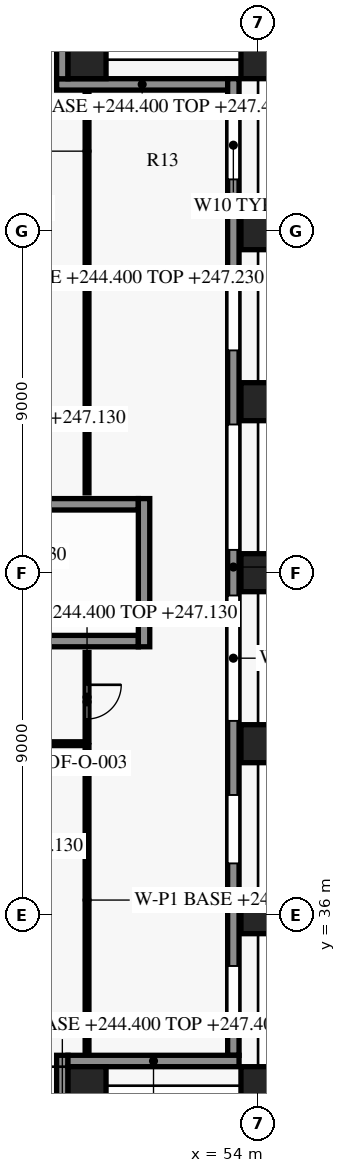
"""IFC4 building model, lengths in metres.
Left out: names, types, materials, properties, quantities, classifications, styles, units other than length and angle.
Written with IfcOpenShell. Run it as: python <this file> out.ifc"""

import sys

from ifc_helpers import new_model, si_unit, direction, frame, frame_2d, origin, origin_2d, place, context, subcontext, project, spatial, rectangle, extrude, element, fill, save


model = new_model("IFC4")
c1 = context("Model", 3, precision=1e-05, world=origin(), true_north=direction((0.0, 1.0)))
c2 = subcontext(c1, "Body", "Model", "MODEL_VIEW")
j1 = project(units=[si_unit("LENGTHUNIT", "METRE"), si_unit("PLANEANGLEUNIT", "RADIAN")], contexts=[c1])
p1 = place(None, origin())
s1 = spatial("IfcSite", under=j1, at=p1, CompositionType="ELEMENT")
p2 = place(p1, origin())
s2 = spatial("IfcBuilding", under=s1, at=p2, CompositionType="ELEMENT")
p3 = place(p2, frame((0.0, 0.0, 244.4)))
s3 = spatial("IfcBuildingStorey", under=s2, at=p3, CompositionType="ELEMENT", Elevation=244.4)
for number, where, z_axis, x_axis in (
    (1, (54.0, 31.5, 0.0), (0.0, 0.0, 1.0), (0.0, 1.0, 0.0)),
    (2, (54.0, 36.0, 0.0), (0.0, 0.0, 1.0), (0.0, 1.0, 0.0)),
    (3, (54.0, 40.5, 0.0), (0.0, 0.0, 1.0), (0.0, 1.0, 0.0)),
    (4, (54.0, 45.0, 0.0), (0.0, 0.0, 1.0), (0.0, 1.0, 0.0)),
    (5, (54.0, 49.5, 0.0), (0.0, 0.0, 1.0), (0.0, 1.0, 0.0)),
    (6, (54.0, 54.0, 0.0), (0.0, 0.0, 1.0), (0.0, 1.0, 0.0)),
    (7, (54.0, 58.5, 0.0), (0.0, 0.0, 1.0), (0.0, 1.0, 0.0)),
):
    element("IfcColumn", number, at=place(p3, frame(where, z_axis=z_axis, x_axis=x_axis)), inside=s3, PredefinedType="COLUMN", context=c2, shape_type="SweptSolid", body=[
        extrude(rectangle(XDim=0.9, YDim=1.0, at=origin_2d()), origin(), (0.0, 0.0, 1.0), 3.8),
    ])
for number, where, z_axis, x_axis in (
    (8, (49.5, 31.5, 0.0), (0.0, 0.0, 1.0), (1.0, 0.0, 0.0)),
    (9, (49.5, 58.5, 0.0), (0.0, 0.0, 1.0), (1.0, 0.0, 0.0)),
):
    element("IfcColumn", number, at=place(p3, frame(where, z_axis=z_axis, x_axis=x_axis)), inside=s3, PredefinedType="COLUMN", context=c2, shape_type="SweptSolid", body=[
        extrude(rectangle(XDim=1.0, YDim=1.0, at=origin_2d()), origin(), (0.0, 0.0, 1.0), 3.8),
    ])
p4 = place(p3, frame((48.85, 32.3, 0.0), z_axis=(0.0, 0.0, 1.0), x_axis=(0.0, -1.0, 0.0)))
e10 = element("IfcWall", 10, at=p4, inside=s3, PredefinedType="SOLIDWALL", context=c2, shape_type="SweptSolid", body=[
    extrude(rectangle(XDim=5.01, YDim=0.3, at=frame_2d((2.505, 0.0))), origin(), (0.0, 0.0, 1.0), 3.0),
])
p5 = place(p3, frame((53.5, 32.15, 0.0), z_axis=(0.0, 0.0, 1.0), x_axis=(-1.0, 0.0, 0.0)))
e11 = element("IfcWall", 11, at=p5, inside=s3, PredefinedType="SOLIDWALL", context=c2, shape_type="SweptSolid", body=[
    extrude(rectangle(XDim=4.502, YDim=0.3, at=frame_2d((2.251, 0.0))), origin(), (0.0, 0.0, 1.0), 3.0),
])
p6 = place(p3, frame((53.35, 58.0, 0.0), z_axis=(0.0, 0.0, 1.0), x_axis=(0.0, -1.0, 0.0)))
e12 = element("IfcWall", 12, at=p6, inside=s3, PredefinedType="SOLIDWALL", context=c2, shape_type="SweptSolid", body=[
    extrude(rectangle(XDim=25.702, YDim=0.3, at=frame_2d((12.851, 0.0))), origin(), (0.0, 0.0, 1.0), 3.0),
])
p7 = place(p6, frame((0.85, 0.0, 0.75)))
e13 = element("IfcOpeningElement", 13, at=p7, cuts=e12, PredefinedType="OPENING", context=c2, shape_type="SweptSolid", body=[
    extrude(rectangle(XDim=1.8, YDim=1.8, at=frame_2d((0.9, 0.9))), frame((0.0, 0.16, 0.0), z_axis=(0.0, -1.0, 0.0), x_axis=(1.0, 0.0, 0.0)), (0.0, 0.0, 1.0), 0.32),
])
p8 = place(p6, frame((5.35, 0.0, 0.75)))
e14 = element("IfcOpeningElement", 14, at=p8, cuts=e12, PredefinedType="OPENING", context=c2, shape_type="SweptSolid", body=[
    extrude(rectangle(XDim=1.8, YDim=1.8, at=frame_2d((0.9, 0.9))), frame((0.0, 0.16, 0.0), z_axis=(0.0, -1.0, 0.0), x_axis=(1.0, 0.0, 0.0)), (0.0, 0.0, 1.0), 0.32),
])
p9 = place(p6, frame((9.1, 0.0, 0.15)))
e15 = element("IfcOpeningElement", 15, at=p9, cuts=e12, PredefinedType="OPENING", context=c2, shape_type="SweptSolid", body=[
    extrude(rectangle(XDim=3.3, YDim=2.4, at=frame_2d((1.65, 1.2))), frame((0.0, 0.16, 0.0), z_axis=(0.0, -1.0, 0.0), x_axis=(1.0, 0.0, 0.0)), (0.0, 0.0, 1.0), 0.32),
])
p10 = place(p6, frame((13.6, 0.0, 0.15)))
e16 = element("IfcOpeningElement", 16, at=p10, cuts=e12, PredefinedType="OPENING", context=c2, shape_type="SweptSolid", body=[
    extrude(rectangle(XDim=3.3, YDim=2.4, at=frame_2d((1.65, 1.2))), frame((0.0, 0.16, 0.0), z_axis=(0.0, -1.0, 0.0), x_axis=(1.0, 0.0, 0.0)), (0.0, 0.0, 1.0), 0.32),
])
p11 = place(p6, frame((18.85, 0.0, 0.75)))
e17 = element("IfcOpeningElement", 17, at=p11, cuts=e12, PredefinedType="OPENING", context=c2, shape_type="SweptSolid", body=[
    extrude(rectangle(XDim=1.8, YDim=1.8, at=frame_2d((0.9, 0.9))), frame((0.0, 0.16, 0.0), z_axis=(0.0, -1.0, 0.0), x_axis=(1.0, 0.0, 0.0)), (0.0, 0.0, 1.0), 0.32),
])
p12 = place(p6, frame((23.35, 0.0, 0.75)))
e18 = element("IfcOpeningElement", 18, at=p12, cuts=e12, PredefinedType="OPENING", context=c2, shape_type="SweptSolid", body=[
    extrude(rectangle(XDim=1.8, YDim=1.8, at=frame_2d((0.9, 0.9))), frame((0.0, 0.16, 0.0), z_axis=(0.0, -1.0, 0.0), x_axis=(1.0, 0.0, 0.0)), (0.0, 0.0, 1.0), 0.32),
])
p13 = place(p3, frame((48.7, 57.85, 0.0), z_axis=(0.0, 0.0, 1.0), x_axis=(1.0, 0.0, 0.0)))
e19 = element("IfcWall", 19, at=p13, inside=s3, PredefinedType="SOLIDWALL", context=c2, shape_type="SweptSolid", body=[
    extrude(rectangle(XDim=4.502, YDim=0.3, at=frame_2d((2.251, 0.0))), origin(), (0.0, 0.0, 1.0), 3.0),
])
p14 = place(p3, frame((48.85, 62.998, 0.0), z_axis=(0.0, 0.0, 1.0), x_axis=(0.0, -1.0, 0.0)))
e20 = element("IfcWall", 20, at=p14, inside=s3, PredefinedType="SOLIDWALL", context=c2, shape_type="SweptSolid", body=[
    extrude(rectangle(XDim=5.0, YDim=0.3, at=frame_2d((2.5, 0.0))), origin(), (0.0, 0.0, 1.0), 3.0),
])
p15 = place(p3, frame((43.15, 43.2, 0.0), z_axis=(0.0, 0.0, 1.0), x_axis=(1.0, 0.0, 0.0)))
e21 = element("IfcWall", 21, at=p15, inside=s3, PredefinedType="SHEAR", context=c2, shape_type="SweptSolid", body=[
    extrude(rectangle(XDim=7.7, YDim=0.3, at=frame_2d((3.85, 0.0))), origin(), (0.0, 0.0, 1.0), 3.5),
])
p16 = place(p15, frame((0.25, 0.0, 0.0)))
e22 = element("IfcOpeningElement", 22, at=p16, cuts=e21, PredefinedType="OPENING", context=c2, shape_type="SweptSolid", body=[
    extrude(rectangle(XDim=1.2, YDim=2.2, at=frame_2d((0.6, 1.1))), frame((0.0, 0.16, 0.0), z_axis=(0.0, -1.0, 0.0), x_axis=(1.0, 0.0, 0.0)), (0.0, 0.0, 1.0), 0.32),
])
p17 = place(p3, frame((43.15, 46.8, 0.0), z_axis=(0.0, 0.0, 1.0), x_axis=(1.0, 0.0, 0.0)))
e23 = element("IfcWall", 23, at=p17, inside=s3, PredefinedType="SHEAR", context=c2, shape_type="SweptSolid", body=[
    extrude(rectangle(XDim=7.7, YDim=0.3, at=frame_2d((3.85, 0.0))), origin(), (0.0, 0.0, 1.0), 3.5),
])
p18 = place(p3, frame((51.0, 43.05, 0.0), z_axis=(0.0, 0.0, 1.0), x_axis=(0.0, 1.0, 0.0)))
e24 = element("IfcWall", 24, at=p18, inside=s3, PredefinedType="SHEAR", context=c2, shape_type="SweptSolid", body=[
    extrude(rectangle(XDim=3.9, YDim=0.3, at=frame_2d((1.95, 0.0))), origin(), (0.0, 0.0, 1.0), 3.5),
])
p19 = place(p3, frame((49.5, 32.32, 0.0), z_axis=(0.0, 0.0, 1.0), x_axis=(0.0, 1.0, 0.0)))
e25 = element("IfcWall", 25, at=p19, inside=s3, PredefinedType="PARTITIONING", context=c2, shape_type="SweptSolid", body=[
    extrude(rectangle(XDim=8.13, YDim=0.1, at=frame_2d((4.065, 0.0))), origin(), (0.0, 0.0, 1.0), 2.73),
])
p20 = place(p3, frame((49.45, 40.5, 0.0), z_axis=(0.0, 0.0, 1.0), x_axis=(-1.0, 0.0, 0.0)))
e26 = element("IfcWall", 26, at=p20, inside=s3, PredefinedType="PARTITIONING", context=c2, shape_type="SweptSolid", body=[
    extrude(rectangle(XDim=13.4, YDim=0.1, at=frame_2d((6.7, 0.0))), origin(), (0.0, 0.0, 1.0), 2.73),
])
p21 = place(p20, frame((8.05, 0.0, 0.0)))
e27 = element("IfcOpeningElement", 27, at=p21, cuts=e26, PredefinedType="OPENING", context=c2, shape_type="SweptSolid", body=[
    extrude(rectangle(XDim=1.8, YDim=2.1, at=frame_2d((0.9, 1.05))), frame((0.0, 0.06, 0.0), z_axis=(0.0, -1.0, 0.0), x_axis=(1.0, 0.0, 0.0)), (0.0, 0.0, 1.0), 0.12),
])
p22 = place(p3, frame((49.5, 42.9, 0.0), z_axis=(0.0, 0.0, 1.0), x_axis=(0.0, -1.0, 0.0)))
e28 = element("IfcWall", 28, at=p22, inside=s3, PredefinedType="PARTITIONING", context=c2, shape_type="SweptSolid", body=[
    extrude(rectangle(XDim=2.35, YDim=0.1, at=frame_2d((1.175, 0.0))), origin(), (0.0, 0.0, 1.0), 2.73),
])
p23 = place(p22, frame((0.85, 0.0, 0.0)))
e29 = element("IfcOpeningElement", 29, at=p23, cuts=e28, PredefinedType="OPENING", context=c2, shape_type="SweptSolid", body=[
    extrude(rectangle(XDim=0.9, YDim=2.1, at=frame_2d((0.45, 1.05))), frame((0.0, 0.06, 0.0), z_axis=(0.0, -1.0, 0.0), x_axis=(1.0, 0.0, 0.0)), (0.0, 0.0, 1.0), 0.12),
])
p24 = place(p3, frame((49.5, 47.1, 0.0), z_axis=(0.0, 0.0, 1.0), x_axis=(0.0, 1.0, 0.0)))
e30 = element("IfcWall", 30, at=p24, inside=s3, PredefinedType="PARTITIONING", context=c2, shape_type="SweptSolid", body=[
    extrude(rectangle(XDim=10.58, YDim=0.1, at=frame_2d((5.29, 0.0))), origin(), (0.0, 0.0, 1.0), 2.73),
])
p25 = place(p7, origin())
e31 = element("IfcWindow", 31, at=p25, inside=s3, PartitioningType="SINGLE_PANEL", PredefinedType="WINDOW", context=c2, shape_type="SweptSolid", body=[
    extrude(rectangle(XDim=1.8, YDim=1.8, at=frame_2d((0.9, 0.9))), frame((0.0, 0.03, 0.0), z_axis=(0.0, -1.0, 0.0), x_axis=(1.0, 0.0, 0.0)), (0.0, 0.0, 1.0), 0.06),
])
fill(e13, e31)
p26 = place(p8, origin())
e32 = element("IfcWindow", 32, at=p26, inside=s3, PartitioningType="SINGLE_PANEL", PredefinedType="WINDOW", context=c2, shape_type="SweptSolid", body=[
    extrude(rectangle(XDim=1.8, YDim=1.8, at=frame_2d((0.9, 0.9))), frame((0.0, 0.03, 0.0), z_axis=(0.0, -1.0, 0.0), x_axis=(1.0, 0.0, 0.0)), (0.0, 0.0, 1.0), 0.06),
])
fill(e14, e32)
p27 = place(p9, origin())
e33 = element("IfcWindow", 33, at=p27, inside=s3, PartitioningType="SINGLE_PANEL", PredefinedType="WINDOW", context=c2, shape_type="SweptSolid", body=[
    extrude(rectangle(XDim=3.3, YDim=2.4, at=frame_2d((1.65, 1.2))), frame((0.0, 0.03, 0.0), z_axis=(0.0, -1.0, 0.0), x_axis=(1.0, 0.0, 0.0)), (0.0, 0.0, 1.0), 0.06),
])
fill(e15, e33)
p28 = place(p10, origin())
e34 = element("IfcWindow", 34, at=p28, inside=s3, PartitioningType="SINGLE_PANEL", PredefinedType="WINDOW", context=c2, shape_type="SweptSolid", body=[
    extrude(rectangle(XDim=3.3, YDim=2.4, at=frame_2d((1.65, 1.2))), frame((0.0, 0.03, 0.0), z_axis=(0.0, -1.0, 0.0), x_axis=(1.0, 0.0, 0.0)), (0.0, 0.0, 1.0), 0.06),
])
fill(e16, e34)
p29 = place(p11, origin())
e35 = element("IfcWindow", 35, at=p29, inside=s3, PartitioningType="SINGLE_PANEL", PredefinedType="WINDOW", context=c2, shape_type="SweptSolid", body=[
    extrude(rectangle(XDim=1.8, YDim=1.8, at=frame_2d((0.9, 0.9))), frame((0.0, 0.03, 0.0), z_axis=(0.0, -1.0, 0.0), x_axis=(1.0, 0.0, 0.0)), (0.0, 0.0, 1.0), 0.06),
])
fill(e17, e35)
p30 = place(p12, origin())
e36 = element("IfcWindow", 36, at=p30, inside=s3, PartitioningType="SINGLE_PANEL", PredefinedType="WINDOW", context=c2, shape_type="SweptSolid", body=[
    extrude(rectangle(XDim=1.8, YDim=1.8, at=frame_2d((0.9, 0.9))), frame((0.0, 0.03, 0.0), z_axis=(0.0, -1.0, 0.0), x_axis=(1.0, 0.0, 0.0)), (0.0, 0.0, 1.0), 0.06),
])
fill(e18, e36)
p31 = place(p23, origin())
e37 = element("IfcDoor", 37, at=p31, inside=s3, OperationType="SINGLE_SWING_LEFT", PredefinedType="DOOR", context=c2, shape_type="SweptSolid", body=[
    extrude(rectangle(XDim=0.9, YDim=2.1, at=frame_2d((0.45, 1.05))), frame((0.0, 0.025, 0.0), z_axis=(0.0, -1.0, 0.0), x_axis=(1.0, 0.0, 0.0)), (0.0, 0.0, 1.0), 0.05),
])
fill(e29, e37)
save(model, sys.argv[1])
